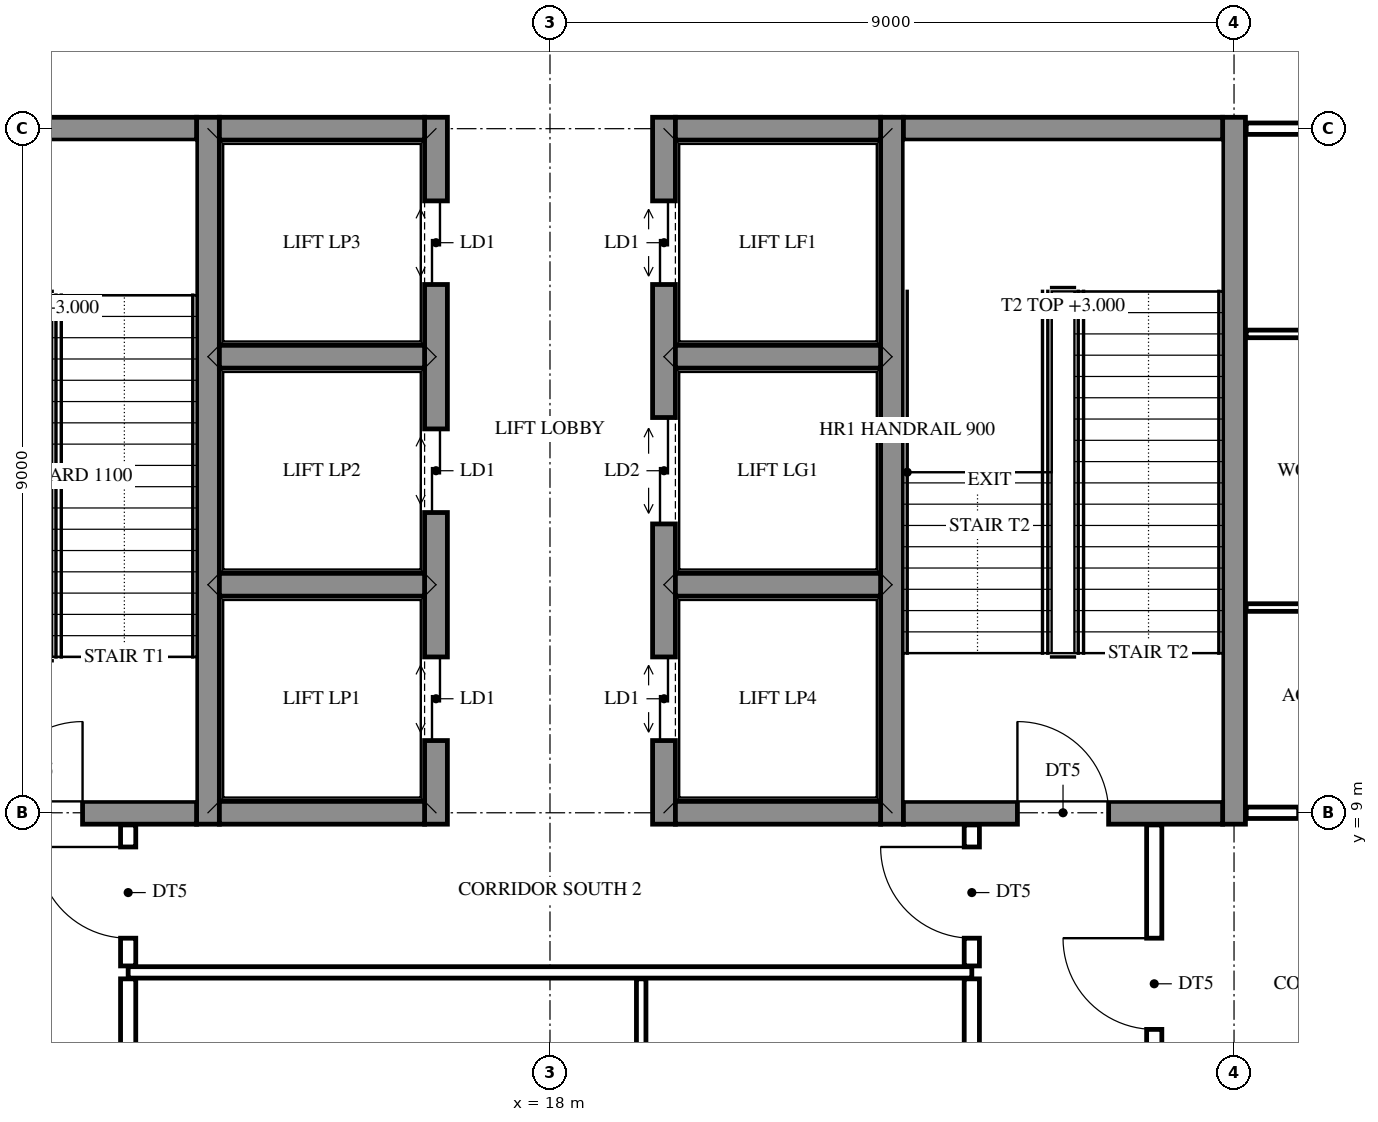
"""IFC4 building model, lengths in metres.
Left out: names, types, materials, properties, quantities, classifications, styles, units other than length and angle.
Written with IfcOpenShell. Run it as: python <this file> out.ifc"""

import sys

from ifc_helpers import new_model, si_unit, direction, frame, frame_2d, origin, place, context, subcontext, project, spatial, rectangle, extrude, element, fill, save


model = new_model("IFC4")
c1 = context("Model", 3, precision=1e-05, world=origin(), true_north=direction((0.0, 1.0)))
c2 = subcontext(c1, "Body", "Model", "MODEL_VIEW")
j1 = project(units=[si_unit("LENGTHUNIT", "METRE"), si_unit("PLANEANGLEUNIT", "RADIAN")], contexts=[c1])
p1 = place(None, origin())
s1 = spatial("IfcSite", under=j1, at=p1, CompositionType="ELEMENT")
p2 = place(p1, origin())
s2 = spatial("IfcBuilding", under=s1, at=p2, CompositionType="ELEMENT")
p3 = place(p2, origin())
s3 = spatial("IfcBuildingStorey", under=s2, at=p3, CompositionType="ELEMENT", Elevation=0.0)
p4 = place(p3, frame((13.5, 8.85, 0.0), z_axis=(0.0, 0.0, 1.0), x_axis=(0.0, 1.0, 0.0)))
e1 = element("IfcWall", 1, at=p4, inside=s3, PredefinedType="SHEAR", context=c2, shape_type="SweptSolid", body=[
    extrude(rectangle(XDim=9.3, YDim=0.3, at=frame_2d((4.65, 0.0))), origin(), (0.0, 0.0, 1.0), 6.0),
])
p5 = place(p3, frame((16.5, 8.85, 0.0), z_axis=(0.0, 0.0, 1.0), x_axis=(0.0, 1.0, 0.0)))
e2 = element("IfcWall", 2, at=p5, inside=s3, PredefinedType="SHEAR", context=c2, shape_type="SweptSolid", body=[
    extrude(rectangle(XDim=9.3, YDim=0.3, at=frame_2d((4.65, 0.0))), origin(), (0.0, 0.0, 1.0), 6.0),
])
p6 = place(p5, frame((1.1, 0.0, 0.0)))
e3 = element("IfcOpeningElement", 3, at=p6, cuts=e2, PredefinedType="OPENING", context=c2, shape_type="SweptSolid", body=[
    extrude(rectangle(XDim=1.1, YDim=2.1, at=frame_2d((0.55, 1.05))), frame((0.0, 0.16, 0.0), z_axis=(0.0, -1.0, 0.0), x_axis=(1.0, 0.0, 0.0)), (0.0, 0.0, 1.0), 0.32),
])
p7 = place(p5, frame((4.1, 0.0, 0.0)))
e4 = element("IfcOpeningElement", 4, at=p7, cuts=e2, PredefinedType="OPENING", context=c2, shape_type="SweptSolid", body=[
    extrude(rectangle(XDim=1.1, YDim=2.1, at=frame_2d((0.55, 1.05))), frame((0.0, 0.16, 0.0), z_axis=(0.0, -1.0, 0.0), x_axis=(1.0, 0.0, 0.0)), (0.0, 0.0, 1.0), 0.32),
])
p8 = place(p5, frame((7.1, 0.0, 0.0)))
e5 = element("IfcOpeningElement", 5, at=p8, cuts=e2, PredefinedType="OPENING", context=c2, shape_type="SweptSolid", body=[
    extrude(rectangle(XDim=1.1, YDim=2.1, at=frame_2d((0.55, 1.05))), frame((0.0, 0.16, 0.0), z_axis=(0.0, -1.0, 0.0), x_axis=(1.0, 0.0, 0.0)), (0.0, 0.0, 1.0), 0.32),
])
p9 = place(p3, frame((19.5, 8.85, 0.0), z_axis=(0.0, 0.0, 1.0), x_axis=(0.0, 1.0, 0.0)))
e6 = element("IfcWall", 6, at=p9, inside=s3, PredefinedType="SHEAR", context=c2, shape_type="SweptSolid", body=[
    extrude(rectangle(XDim=9.3, YDim=0.3, at=frame_2d((4.65, 0.0))), origin(), (0.0, 0.0, 1.0), 6.0),
])
p10 = place(p9, frame((1.1, 0.0, 0.0)))
e7 = element("IfcOpeningElement", 7, at=p10, cuts=e6, PredefinedType="OPENING", context=c2, shape_type="SweptSolid", body=[
    extrude(rectangle(XDim=1.1, YDim=2.1, at=frame_2d((0.55, 1.05))), frame((0.0, 0.16, 0.0), z_axis=(0.0, -1.0, 0.0), x_axis=(1.0, 0.0, 0.0)), (0.0, 0.0, 1.0), 0.32),
])
p11 = place(p9, frame((3.95, 0.0, 0.0)))
e8 = element("IfcOpeningElement", 8, at=p11, cuts=e6, PredefinedType="OPENING", context=c2, shape_type="SweptSolid", body=[
    extrude(rectangle(XDim=1.4, YDim=2.1, at=frame_2d((0.7, 1.05))), frame((0.0, 0.16, 0.0), z_axis=(0.0, -1.0, 0.0), x_axis=(1.0, 0.0, 0.0)), (0.0, 0.0, 1.0), 0.32),
])
p12 = place(p9, frame((7.1, 0.0, 0.0)))
e9 = element("IfcOpeningElement", 9, at=p12, cuts=e6, PredefinedType="OPENING", context=c2, shape_type="SweptSolid", body=[
    extrude(rectangle(XDim=1.1, YDim=2.1, at=frame_2d((0.55, 1.05))), frame((0.0, 0.16, 0.0), z_axis=(0.0, -1.0, 0.0), x_axis=(1.0, 0.0, 0.0)), (0.0, 0.0, 1.0), 0.32),
])
for number, where, z_axis, x_axis in (
    (10, (22.5, 8.85, 0.0), (0.0, 0.0, 1.0), (0.0, 1.0, 0.0)),
    (11, (27.0, 8.85, 0.0), (0.0, 0.0, 1.0), (0.0, 1.0, 0.0)),
):
    element("IfcWall", number, at=place(p3, frame(where, z_axis=z_axis, x_axis=x_axis)), inside=s3, PredefinedType="SHEAR", context=c2, shape_type="SweptSolid", body=[
        extrude(rectangle(XDim=9.3, YDim=0.3, at=frame_2d((4.65, 0.0))), origin(), (0.0, 0.0, 1.0), 6.0),
    ])
p13 = place(p3, frame((9.15, 9.0, 0.0), z_axis=(0.0, 0.0, 1.0), x_axis=(1.0, 0.0, 0.0)))
e12 = element("IfcWall", 12, at=p13, inside=s3, PredefinedType="SHEAR", context=c2, shape_type="SweptSolid", body=[
    extrude(rectangle(XDim=4.2, YDim=0.3, at=frame_2d((2.1, 0.0))), origin(), (0.0, 0.0, 1.0), 6.0),
])
p14 = place(p13, frame((1.5, 0.0, 0.0)))
e13 = element("IfcOpeningElement", 13, at=p14, cuts=e12, PredefinedType="OPENING", context=c2, shape_type="SweptSolid", body=[
    extrude(rectangle(XDim=1.2, YDim=2.1, at=frame_2d((0.6, 1.05))), frame((0.0, 0.16, 0.0), z_axis=(0.0, -1.0, 0.0), x_axis=(1.0, 0.0, 0.0)), (0.0, 0.0, 1.0), 0.32),
])
for number, where, z_axis, x_axis in (
    (14, (13.65, 9.0, 0.0), (0.0, 0.0, 1.0), (1.0, 0.0, 0.0)),
    (15, (19.65, 9.0, 0.0), (0.0, 0.0, 1.0), (1.0, 0.0, 0.0)),
):
    element("IfcWall", number, at=place(p3, frame(where, z_axis=z_axis, x_axis=x_axis)), inside=s3, PredefinedType="SHEAR", context=c2, shape_type="SweptSolid", body=[
        extrude(rectangle(XDim=2.7, YDim=0.3, at=frame_2d((1.35, 0.0))), origin(), (0.0, 0.0, 1.0), 6.0),
    ])
p15 = place(p3, frame((22.65, 9.0, 0.0), z_axis=(0.0, 0.0, 1.0), x_axis=(1.0, 0.0, 0.0)))
e16 = element("IfcWall", 16, at=p15, inside=s3, PredefinedType="SHEAR", context=c2, shape_type="SweptSolid", body=[
    extrude(rectangle(XDim=4.2, YDim=0.3, at=frame_2d((2.1, 0.0))), origin(), (0.0, 0.0, 1.0), 6.0),
])
p16 = place(p15, frame((1.5, 0.0, 0.0)))
e17 = element("IfcOpeningElement", 17, at=p16, cuts=e16, PredefinedType="OPENING", context=c2, shape_type="SweptSolid", body=[
    extrude(rectangle(XDim=1.2, YDim=2.1, at=frame_2d((0.6, 1.05))), frame((0.0, 0.16, 0.0), z_axis=(0.0, -1.0, 0.0), x_axis=(1.0, 0.0, 0.0)), (0.0, 0.0, 1.0), 0.32),
])
for number, where, z_axis, x_axis in (
    (18, (13.65, 12.0, 0.0), (0.0, 0.0, 1.0), (1.0, 0.0, 0.0)),
    (19, (19.65, 12.0, 0.0), (0.0, 0.0, 1.0), (1.0, 0.0, 0.0)),
    (20, (13.65, 15.0, 0.0), (0.0, 0.0, 1.0), (1.0, 0.0, 0.0)),
    (21, (19.65, 15.0, 0.0), (0.0, 0.0, 1.0), (1.0, 0.0, 0.0)),
):
    element("IfcWall", number, at=place(p3, frame(where, z_axis=z_axis, x_axis=x_axis)), inside=s3, PredefinedType="SHEAR", context=c2, shape_type="SweptSolid", body=[
        extrude(rectangle(XDim=2.7, YDim=0.3, at=frame_2d((1.35, 0.0))), origin(), (0.0, 0.0, 1.0), 6.0),
    ])
p17 = place(p3, frame((9.15, 18.0, 0.0), z_axis=(0.0, 0.0, 1.0), x_axis=(1.0, 0.0, 0.0)))
e22 = element("IfcWall", 22, at=p17, inside=s3, PredefinedType="SHEAR", context=c2, shape_type="SweptSolid", body=[
    extrude(rectangle(XDim=4.2, YDim=0.3, at=frame_2d((2.1, 0.0))), origin(), (0.0, 0.0, 1.0), 6.0),
])
for number, where, z_axis, x_axis in (
    (23, (13.65, 18.0, 0.0), (0.0, 0.0, 1.0), (1.0, 0.0, 0.0)),
    (24, (19.65, 18.0, 0.0), (0.0, 0.0, 1.0), (1.0, 0.0, 0.0)),
):
    element("IfcWall", number, at=place(p3, frame(where, z_axis=z_axis, x_axis=x_axis)), inside=s3, PredefinedType="SHEAR", context=c2, shape_type="SweptSolid", body=[
        extrude(rectangle(XDim=2.7, YDim=0.3, at=frame_2d((1.35, 0.0))), origin(), (0.0, 0.0, 1.0), 6.0),
    ])
p18 = place(p3, frame((22.65, 18.0, 0.0), z_axis=(0.0, 0.0, 1.0), x_axis=(1.0, 0.0, 0.0)))
e25 = element("IfcWall", 25, at=p18, inside=s3, PredefinedType="SHEAR", context=c2, shape_type="SweptSolid", body=[
    extrude(rectangle(XDim=4.2, YDim=0.3, at=frame_2d((2.1, 0.0))), origin(), (0.0, 0.0, 1.0), 6.0),
])
p19 = place(p3, frame((12.45, -0.201, 0.0), z_axis=(0.0, 0.0, 1.0), x_axis=(0.0, 1.0, 0.0)))
e26 = element("IfcWall", 26, at=p19, inside=s3, PredefinedType="PARTITIONING", context=c2, shape_type="SweptSolid", body=[
    extrude(rectangle(XDim=7.016, YDim=0.2, at=frame_2d((3.508, 0.0))), origin(), (0.0, 0.0, 1.0), 5.218),
])
p20 = place(p19, frame((2.751, 0.0, 0.0)))
e27 = element("IfcOpeningElement", 27, at=p20, cuts=e26, PredefinedType="OPENING", context=c2, shape_type="SweptSolid", body=[
    extrude(rectangle(XDim=1.8, YDim=2.1, at=frame_2d((0.9, 1.05))), frame((0.0, 0.11, 0.0), z_axis=(0.0, -1.0, 0.0), x_axis=(1.0, 0.0, 0.0)), (0.0, 0.0, 1.0), 0.22),
])
p21 = place(p3, frame((12.45, 6.985, 0.0), z_axis=(0.0, 0.0, 1.0), x_axis=(0.0, 1.0, 0.0)))
e28 = element("IfcWall", 28, at=p21, inside=s3, PredefinedType="PARTITIONING", context=c2, shape_type="SweptSolid", body=[
    extrude(rectangle(XDim=1.855, YDim=0.2, at=frame_2d((0.927, 0.0))), origin(), (0.0, 0.0, 1.0), 5.218),
])
p22 = place(p21, frame((0.365, 0.0, 0.0)))
e29 = element("IfcOpeningElement", 29, at=p22, cuts=e28, PredefinedType="OPENING", context=c2, shape_type="SweptSolid", body=[
    extrude(rectangle(XDim=1.2, YDim=2.1, at=frame_2d((0.6, 1.05))), frame((0.0, 0.11, 0.0), z_axis=(0.0, -1.0, 0.0), x_axis=(1.0, 0.0, 0.0)), (0.0, 0.0, 1.0), 0.22),
])
p23 = place(p3, frame((19.2, -0.201, 0.0), z_axis=(0.0, 0.0, 1.0), x_axis=(0.0, 1.0, 0.0)))
e30 = element("IfcWall", 30, at=p23, inside=s3, PredefinedType="PARTITIONING", context=c2, shape_type="SweptSolid", body=[
    extrude(rectangle(XDim=7.016, YDim=0.125, at=frame_2d((3.508, 0.0))), origin(), (0.0, 0.0, 1.0), 5.218),
])
p24 = place(p3, frame((23.55, -0.201, 0.0), z_axis=(0.0, 0.0, 1.0), x_axis=(0.0, 1.0, 0.0)))
e31 = element("IfcWall", 31, at=p24, inside=s3, PredefinedType="PARTITIONING", context=c2, shape_type="SweptSolid", body=[
    extrude(rectangle(XDim=7.016, YDim=0.2, at=frame_2d((3.508, 0.0))), origin(), (0.0, 0.0, 1.0), 5.218),
])
p25 = place(p24, frame((3.151, 0.0, 0.0)))
e32 = element("IfcOpeningElement", 32, at=p25, cuts=e31, PredefinedType="OPENING", context=c2, shape_type="SweptSolid", body=[
    extrude(rectangle(XDim=1.0, YDim=2.1, at=frame_2d((0.5, 1.05))), frame((0.0, 0.11, 0.0), z_axis=(0.0, -1.0, 0.0), x_axis=(1.0, 0.0, 0.0)), (0.0, 0.0, 1.0), 0.22),
])
p26 = place(p3, frame((23.55, 6.985, 0.0), z_axis=(0.0, 0.0, 1.0), x_axis=(0.0, 1.0, 0.0)))
e33 = element("IfcWall", 33, at=p26, inside=s3, PredefinedType="PARTITIONING", context=c2, shape_type="SweptSolid", body=[
    extrude(rectangle(XDim=1.855, YDim=0.2, at=frame_2d((0.927, 0.0))), origin(), (0.0, 0.0, 1.0), 5.218),
])
p27 = place(p26, frame((0.365, 0.0, 0.0)))
e34 = element("IfcOpeningElement", 34, at=p27, cuts=e33, PredefinedType="OPENING", context=c2, shape_type="SweptSolid", body=[
    extrude(rectangle(XDim=1.2, YDim=2.1, at=frame_2d((0.6, 1.05))), frame((0.0, 0.11, 0.0), z_axis=(0.0, -1.0, 0.0), x_axis=(1.0, 0.0, 0.0)), (0.0, 0.0, 1.0), 0.22),
])
p28 = place(p3, frame((25.95, -0.201, 0.0), z_axis=(0.0, 0.0, 1.0), x_axis=(0.0, 1.0, 0.0)))
e35 = element("IfcWall", 35, at=p28, inside=s3, PredefinedType="PARTITIONING", context=c2, shape_type="SweptSolid", body=[
    extrude(rectangle(XDim=9.041, YDim=0.2, at=frame_2d((4.521, 0.0))), origin(), (0.0, 0.0, 1.0), 5.218),
])
p29 = place(p28, frame((6.351, 0.0, 0.0)))
e36 = element("IfcOpeningElement", 36, at=p29, cuts=e35, PredefinedType="OPENING", context=c2, shape_type="SweptSolid", body=[
    extrude(rectangle(XDim=1.2, YDim=2.1, at=frame_2d((0.6, 1.05))), frame((0.0, 0.11, 0.0), z_axis=(0.0, -1.0, 0.0), x_axis=(1.0, 0.0, 0.0)), (0.0, 0.0, 1.0), 0.22),
])
p30 = place(p3, frame((12.45, 6.9, 0.0), z_axis=(0.0, 0.0, 1.0), x_axis=(1.0, 0.0, 0.0)))
e37 = element("IfcWall", 37, at=p30, inside=s3, PredefinedType="PARTITIONING", context=c2, shape_type="SweptSolid", body=[
    extrude(rectangle(XDim=11.1, YDim=0.15, at=frame_2d((5.55, 0.0))), origin(), (0.0, 0.0, 1.0), 5.218),
])
p31 = place(p3, frame((27.16, 9.0, 0.0), z_axis=(0.0, 0.0, 1.0), x_axis=(1.0, 0.0, 0.0)))
e38 = element("IfcWall", 38, at=p31, inside=s3, PredefinedType="PARTITIONING", context=c2, shape_type="SweptSolid", body=[
    extrude(rectangle(XDim=2.455, YDim=0.15, at=frame_2d((1.228, 0.0))), origin(), (0.0, 0.0, 1.0), 5.218),
])
p32 = place(p31, frame((0.69, 0.0, 0.0)))
e39 = element("IfcOpeningElement", 39, at=p32, cuts=e38, PredefinedType="OPENING", context=c2, shape_type="SweptSolid", body=[
    extrude(rectangle(XDim=1.0, YDim=2.1, at=frame_2d((0.5, 1.05))), frame((0.0, 0.085, 0.0), z_axis=(0.0, -1.0, 0.0), x_axis=(1.0, 0.0, 0.0)), (0.0, 0.0, 1.0), 0.17),
])
for number, where, z_axis, x_axis in (
    (40, (27.16, 11.7, 0.0), (0.0, 0.0, 1.0), (1.0, 0.0, 0.0)),
    (41, (27.16, 15.3, 0.0), (0.0, 0.0, 1.0), (1.0, 0.0, 0.0)),
):
    element("IfcWall", number, at=place(p3, frame(where, z_axis=z_axis, x_axis=x_axis)), inside=s3, PredefinedType="PARTITIONING", context=c2, shape_type="SweptSolid", body=[
        extrude(rectangle(XDim=2.455, YDim=0.1, at=frame_2d((1.228, 0.0))), origin(), (0.0, 0.0, 1.0), 5.218),
    ])
p33 = place(p3, frame((27.16, 18.0, 0.0), z_axis=(0.0, 0.0, 1.0), x_axis=(1.0, 0.0, 0.0)))
e42 = element("IfcWall", 42, at=p33, inside=s3, PredefinedType="PARTITIONING", context=c2, shape_type="SweptSolid", body=[
    extrude(rectangle(XDim=4.13, YDim=0.15, at=frame_2d((2.065, 0.0))), origin(), (0.0, 0.0, 1.0), 5.218),
])
p34 = place(p14, origin())
e43 = element("IfcDoor", 43, at=p34, inside=s3, OperationType="SINGLE_SWING_RIGHT", PredefinedType="DOOR", context=c2, shape_type="SweptSolid", body=[
    extrude(rectangle(XDim=1.2, YDim=2.1, at=frame_2d((0.6, 1.05))), frame((0.0, 0.025, 0.0), z_axis=(0.0, -1.0, 0.0), x_axis=(1.0, 0.0, 0.0)), (0.0, 0.0, 1.0), 0.05),
])
fill(e13, e43)
p35 = place(p16, origin())
e44 = element("IfcDoor", 44, at=p35, inside=s3, OperationType="SINGLE_SWING_LEFT", PredefinedType="DOOR", context=c2, shape_type="SweptSolid", body=[
    extrude(rectangle(XDim=1.2, YDim=2.1, at=frame_2d((0.6, 1.05))), frame((0.0, 0.025, 0.0), z_axis=(0.0, -1.0, 0.0), x_axis=(1.0, 0.0, 0.0)), (0.0, 0.0, 1.0), 0.05),
])
fill(e17, e44)
p36 = place(p32, origin())
e45 = element("IfcDoor", 45, at=p36, inside=s3, OperationType="SINGLE_SWING_RIGHT", PredefinedType="DOOR", context=c2, shape_type="SweptSolid", body=[
    extrude(rectangle(XDim=1.0, YDim=2.1, at=frame_2d((0.5, 1.05))), frame((0.0, 0.025, 0.0), z_axis=(0.0, -1.0, 0.0), x_axis=(1.0, 0.0, 0.0)), (0.0, 0.0, 1.0), 0.05),
])
fill(e39, e45)
p37 = place(p22, origin())
e46 = element("IfcDoor", 46, at=p37, inside=s3, OperationType="SINGLE_SWING_RIGHT", PredefinedType="DOOR", context=c2, shape_type="SweptSolid", body=[
    extrude(rectangle(XDim=1.2, YDim=2.1, at=frame_2d((0.6, 1.05))), frame((0.0, 0.025, 0.0), z_axis=(0.0, -1.0, 0.0), x_axis=(1.0, 0.0, 0.0)), (0.0, 0.0, 1.0), 0.05),
])
fill(e29, e46)
p38 = place(p27, frame((1.2, 0.0, 0.0), z_axis=(0.0, 0.0, 1.0), x_axis=(-1.0, 0.0, 0.0)))
e47 = element("IfcDoor", 47, at=p38, inside=s3, OperationType="SINGLE_SWING_RIGHT", PredefinedType="DOOR", context=c2, shape_type="SweptSolid", body=[
    extrude(rectangle(XDim=1.2, YDim=2.1, at=frame_2d((0.6, 1.05))), frame((0.0, 0.025, 0.0), z_axis=(0.0, -1.0, 0.0), x_axis=(1.0, 0.0, 0.0)), (0.0, 0.0, 1.0), 0.05),
])
fill(e34, e47)
p39 = place(p29, origin())
e48 = element("IfcDoor", 48, at=p39, inside=s3, OperationType="SINGLE_SWING_RIGHT", PredefinedType="DOOR", context=c2, shape_type="SweptSolid", body=[
    extrude(rectangle(XDim=1.2, YDim=2.1, at=frame_2d((0.6, 1.05))), frame((0.0, 0.025, 0.0), z_axis=(0.0, -1.0, 0.0), x_axis=(1.0, 0.0, 0.0)), (0.0, 0.0, 1.0), 0.05),
])
fill(e36, e48)
p40 = place(p6, origin())
e49 = element("IfcDoor", 49, at=p40, inside=s3, OperationType="DOUBLE_DOOR_SLIDING", PredefinedType="DOOR", context=c2, shape_type="SweptSolid", body=[
    extrude(rectangle(XDim=1.1, YDim=2.1, at=frame_2d((0.55, 1.05))), frame((0.0, 0.025, 0.0), z_axis=(0.0, -1.0, 0.0), x_axis=(1.0, 0.0, 0.0)), (0.0, 0.0, 1.0), 0.05),
])
fill(e3, e49)
p41 = place(p10, origin())
e50 = element("IfcDoor", 50, at=p41, inside=s3, OperationType="DOUBLE_DOOR_SLIDING", PredefinedType="DOOR", context=c2, shape_type="SweptSolid", body=[
    extrude(rectangle(XDim=1.1, YDim=2.1, at=frame_2d((0.55, 1.05))), frame((0.0, 0.025, 0.0), z_axis=(0.0, -1.0, 0.0), x_axis=(1.0, 0.0, 0.0)), (0.0, 0.0, 1.0), 0.05),
])
fill(e7, e50)
p42 = place(p7, origin())
e51 = element("IfcDoor", 51, at=p42, inside=s3, OperationType="DOUBLE_DOOR_SLIDING", PredefinedType="DOOR", context=c2, shape_type="SweptSolid", body=[
    extrude(rectangle(XDim=1.1, YDim=2.1, at=frame_2d((0.55, 1.05))), frame((0.0, 0.025, 0.0), z_axis=(0.0, -1.0, 0.0), x_axis=(1.0, 0.0, 0.0)), (0.0, 0.0, 1.0), 0.05),
])
fill(e4, e51)
p43 = place(p11, origin())
e52 = element("IfcDoor", 52, at=p43, inside=s3, OperationType="DOUBLE_DOOR_SLIDING", PredefinedType="DOOR", context=c2, shape_type="SweptSolid", body=[
    extrude(rectangle(XDim=1.4, YDim=2.1, at=frame_2d((0.7, 1.05))), frame((0.0, 0.025, 0.0), z_axis=(0.0, -1.0, 0.0), x_axis=(1.0, 0.0, 0.0)), (0.0, 0.0, 1.0), 0.05),
])
fill(e8, e52)
p44 = place(p8, origin())
e53 = element("IfcDoor", 53, at=p44, inside=s3, OperationType="DOUBLE_DOOR_SLIDING", PredefinedType="DOOR", context=c2, shape_type="SweptSolid", body=[
    extrude(rectangle(XDim=1.1, YDim=2.1, at=frame_2d((0.55, 1.05))), frame((0.0, 0.025, 0.0), z_axis=(0.0, -1.0, 0.0), x_axis=(1.0, 0.0, 0.0)), (0.0, 0.0, 1.0), 0.05),
])
fill(e5, e53)
p45 = place(p12, origin())
e54 = element("IfcDoor", 54, at=p45, inside=s3, OperationType="DOUBLE_DOOR_SLIDING", PredefinedType="DOOR", context=c2, shape_type="SweptSolid", body=[
    extrude(rectangle(XDim=1.1, YDim=2.1, at=frame_2d((0.55, 1.05))), frame((0.0, 0.025, 0.0), z_axis=(0.0, -1.0, 0.0), x_axis=(1.0, 0.0, 0.0)), (0.0, 0.0, 1.0), 0.05),
])
fill(e9, e54)
save(model, sys.argv[1])
